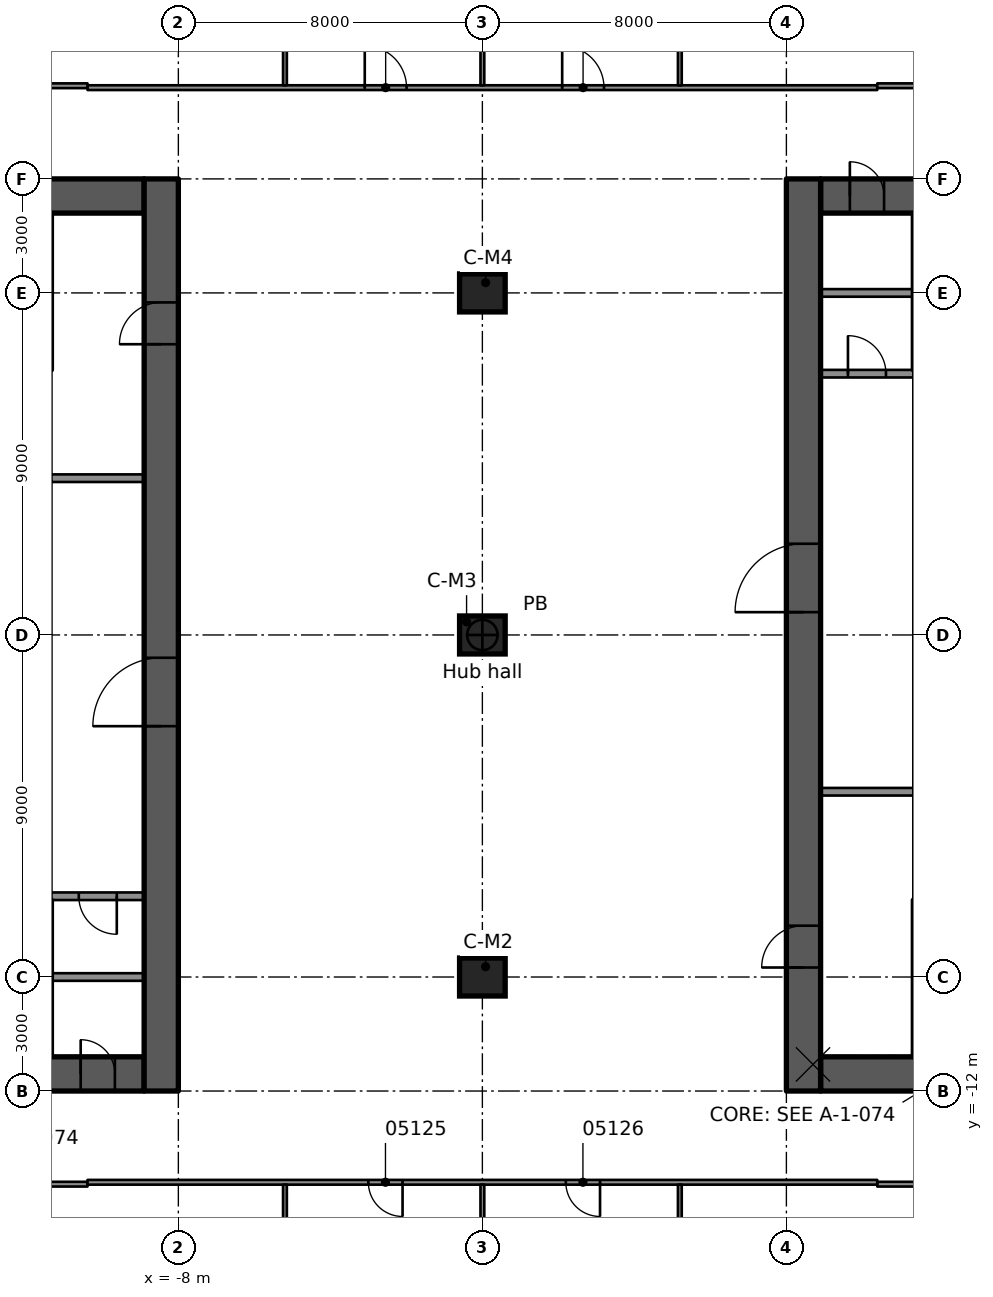
"""IFC4 building model, lengths in metres.
Left out: names, types, materials, properties, quantities, classifications, styles, units other than length and angle.
Written with IfcOpenShell. Run it as: python <this file> out.ifc"""

import sys

from ifc_helpers import new_model, si_unit, direction, frame, frame_2d, origin, origin_2d, place, context, subcontext, project, spatial, rectangle, extrude, element, fill, save


model = new_model("IFC4")
c1 = context("Model", 3, precision=1e-05, world=origin(), true_north=direction((0.0, 1.0)))
c2 = subcontext(c1, "Body", "Model", "MODEL_VIEW")
j1 = project(units=[si_unit("LENGTHUNIT", "METRE"), si_unit("PLANEANGLEUNIT", "RADIAN")], contexts=[c1])
p1 = place(None, origin())
s1 = spatial("IfcSite", under=j1, at=p1, CompositionType="ELEMENT")
p2 = place(p1, origin())
s2 = spatial("IfcBuilding", under=s1, at=p2, CompositionType="ELEMENT")
p3 = place(p2, frame((0.0, 0.0, 25.1)))
s3 = spatial("IfcBuildingStorey", under=s2, at=p3, CompositionType="ELEMENT", Elevation=25.1)
p4 = place(p3, frame((-18.1, 11.55, 0.0), z_axis=(0.0, 0.0, 1.0), x_axis=(1.0, 0.0, 0.0)))
e1 = element("IfcWall", 1, at=p4, inside=s3, PredefinedType="SHEAR", context=c2, shape_type="SweptSolid", body=[
    extrude(rectangle(XDim=9.2, YDim=0.9, at=frame_2d((4.6, 0.0))), origin(), (0.0, 0.0, 1.0), 4.1),
])
p5 = place(p4, frame((5.1, 0.0, 0.0)))
e2 = element("IfcOpeningElement", 2, at=p5, cuts=e1, PredefinedType="OPENING", context=c2, shape_type="SweptSolid", body=[
    extrude(rectangle(XDim=1.1, YDim=2.1, at=frame_2d((0.55, 1.05))), frame((0.0, 0.46, 0.0), z_axis=(0.0, -1.0, 0.0), x_axis=(1.0, 0.0, 0.0)), (0.0, 0.0, 1.0), 0.92),
])
p6 = place(p3, frame((-18.1, -11.55, 0.0), z_axis=(0.0, 0.0, 1.0), x_axis=(1.0, 0.0, 0.0)))
e3 = element("IfcWall", 3, at=p6, inside=s3, PredefinedType="SHEAR", context=c2, shape_type="SweptSolid", body=[
    extrude(rectangle(XDim=9.2, YDim=0.9, at=frame_2d((4.6, 0.0))), origin(), (0.0, 0.0, 1.0), 4.1),
])
p7 = place(p6, frame((5.1, 0.0, 0.0)))
e4 = element("IfcOpeningElement", 4, at=p7, cuts=e3, PredefinedType="OPENING", context=c2, shape_type="SweptSolid", body=[
    extrude(rectangle(XDim=1.1, YDim=2.1, at=frame_2d((0.55, 1.05))), frame((0.0, 0.46, 0.0), z_axis=(0.0, -1.0, 0.0), x_axis=(1.0, 0.0, 0.0)), (0.0, 0.0, 1.0), 0.92),
])
p8 = place(p6, frame((7.53, 0.0, 0.0)))
e5 = element("IfcOpeningElement", 5, at=p8, cuts=e3, PredefinedType="OPENING", context=c2, shape_type="SweptSolid", body=[
    extrude(rectangle(XDim=0.9, YDim=2.1, at=frame_2d((0.45, 1.05))), frame((0.0, 0.46, 0.0), z_axis=(0.0, -1.0, 0.0), x_axis=(1.0, 0.0, 0.0)), (0.0, 0.0, 1.0), 0.92),
])
p9 = place(p3, frame((-8.45, -12.0, 0.0), z_axis=(0.0, 0.0, 1.0), x_axis=(0.0, 1.0, 0.0)))
e6 = element("IfcWall", 6, at=p9, inside=s3, PredefinedType="SHEAR", context=c2, shape_type="SweptSolid", body=[
    extrude(rectangle(XDim=24.0, YDim=0.9, at=frame_2d((12.0, 0.0))), origin(), (0.0, 0.0, 1.0), 4.1),
])
p10 = place(p9, frame((9.6, 0.0, 0.0)))
e7 = element("IfcOpeningElement", 7, at=p10, cuts=e6, PredefinedType="OPENING", context=c2, shape_type="SweptSolid", body=[
    extrude(rectangle(XDim=1.8, YDim=2.1, at=frame_2d((0.9, 1.05))), frame((0.0, 0.46, 0.0), z_axis=(0.0, -1.0, 0.0), x_axis=(1.0, 0.0, 0.0)), (0.0, 0.0, 1.0), 0.92),
])
p11 = place(p9, frame((19.65, 0.0, 0.0)))
e8 = element("IfcOpeningElement", 8, at=p11, cuts=e6, PredefinedType="OPENING", context=c2, shape_type="SweptSolid", body=[
    extrude(rectangle(XDim=1.1, YDim=2.1, at=frame_2d((0.55, 1.05))), frame((0.0, 0.46, 0.0), z_axis=(0.0, -1.0, 0.0), x_axis=(1.0, 0.0, 0.0)), (0.0, 0.0, 1.0), 0.92),
])
p12 = place(p3, frame((8.9, 11.55, 0.0), z_axis=(0.0, 0.0, 1.0), x_axis=(1.0, 0.0, 0.0)))
e9 = element("IfcWall", 9, at=p12, inside=s3, PredefinedType="SHEAR", context=c2, shape_type="SweptSolid", body=[
    extrude(rectangle(XDim=9.2, YDim=0.9, at=frame_2d((4.6, 0.0))), origin(), (0.0, 0.0, 1.0), 4.1),
])
p13 = place(p12, frame((3.0, 0.0, 0.0)))
e10 = element("IfcOpeningElement", 10, at=p13, cuts=e9, PredefinedType="OPENING", context=c2, shape_type="SweptSolid", body=[
    extrude(rectangle(XDim=1.1, YDim=2.1, at=frame_2d((0.55, 1.05))), frame((0.0, 0.46, 0.0), z_axis=(0.0, -1.0, 0.0), x_axis=(1.0, 0.0, 0.0)), (0.0, 0.0, 1.0), 0.92),
])
p14 = place(p12, frame((0.77, 0.0, 0.0)))
e11 = element("IfcOpeningElement", 11, at=p14, cuts=e9, PredefinedType="OPENING", context=c2, shape_type="SweptSolid", body=[
    extrude(rectangle(XDim=0.9, YDim=2.1, at=frame_2d((0.45, 1.05))), frame((0.0, 0.46, 0.0), z_axis=(0.0, -1.0, 0.0), x_axis=(1.0, 0.0, 0.0)), (0.0, 0.0, 1.0), 0.92),
])
p15 = place(p3, frame((8.9, -11.55, 0.0), z_axis=(0.0, 0.0, 1.0), x_axis=(1.0, 0.0, 0.0)))
e12 = element("IfcWall", 12, at=p15, inside=s3, PredefinedType="SHEAR", context=c2, shape_type="SweptSolid", body=[
    extrude(rectangle(XDim=9.2, YDim=0.9, at=frame_2d((4.6, 0.0))), origin(), (0.0, 0.0, 1.0), 4.1),
])
p16 = place(p15, frame((3.0, 0.0, 0.0)))
e13 = element("IfcOpeningElement", 13, at=p16, cuts=e12, PredefinedType="OPENING", context=c2, shape_type="SweptSolid", body=[
    extrude(rectangle(XDim=1.1, YDim=2.1, at=frame_2d((0.55, 1.05))), frame((0.0, 0.46, 0.0), z_axis=(0.0, -1.0, 0.0), x_axis=(1.0, 0.0, 0.0)), (0.0, 0.0, 1.0), 0.92),
])
p17 = place(p3, frame((8.45, -12.0, 0.0), z_axis=(0.0, 0.0, 1.0), x_axis=(0.0, 1.0, 0.0)))
e14 = element("IfcWall", 14, at=p17, inside=s3, PredefinedType="SHEAR", context=c2, shape_type="SweptSolid", body=[
    extrude(rectangle(XDim=24.0, YDim=0.9, at=frame_2d((12.0, 0.0))), origin(), (0.0, 0.0, 1.0), 4.1),
])
p18 = place(p17, frame((12.6, 0.0, 0.0)))
e15 = element("IfcOpeningElement", 15, at=p18, cuts=e14, PredefinedType="OPENING", context=c2, shape_type="SweptSolid", body=[
    extrude(rectangle(XDim=1.8, YDim=2.1, at=frame_2d((0.9, 1.05))), frame((0.0, 0.46, 0.0), z_axis=(0.0, -1.0, 0.0), x_axis=(1.0, 0.0, 0.0)), (0.0, 0.0, 1.0), 0.92),
])
p19 = place(p17, frame((3.25, 0.0, 0.0)))
e16 = element("IfcOpeningElement", 16, at=p19, cuts=e14, PredefinedType="OPENING", context=c2, shape_type="SweptSolid", body=[
    extrude(rectangle(XDim=1.1, YDim=2.1, at=frame_2d((0.55, 1.05))), frame((0.0, 0.46, 0.0), z_axis=(0.0, -1.0, 0.0), x_axis=(1.0, 0.0, 0.0)), (0.0, 0.0, 1.0), 0.92),
])
for number, where, z_axis, x_axis in (
    (17, (0.0, -9.0, 0.0), (0.0, 0.0, 1.0), (1.0, 0.0, 0.0)),
    (18, (0.0, 0.0, 0.0), (0.0, 0.0, 1.0), (1.0, 0.0, 0.0)),
    (19, (0.0, 9.0, 0.0), (0.0, 0.0, 1.0), (1.0, 0.0, 0.0)),
):
    element("IfcColumn", number, at=place(p3, frame(where, z_axis=z_axis, x_axis=x_axis)), inside=s3, PredefinedType="COLUMN", context=c2, shape_type="SweptSolid", body=[
        extrude(rectangle(XDim=1.2, YDim=1.0, at=origin_2d()), origin(), (0.0, 0.0, 1.0), 4.1),
    ])
p20 = place(p3, frame((-8.9, 4.125, 0.0), z_axis=(0.0, 0.0, 1.0), x_axis=(-1.0, 0.0, 0.0)))
e20 = element("IfcWall", 20, at=p20, inside=s3, PredefinedType="PARTITIONING", context=c2, shape_type="SweptSolid", body=[
    extrude(rectangle(XDim=2.44, YDim=0.2, at=frame_2d((1.22, 0.0))), origin(), (0.0, 0.0, 1.0), 3.69),
])
p21 = place(p3, frame((-8.9, -6.875, 0.0), z_axis=(0.0, 0.0, 1.0), x_axis=(-1.0, 0.0, 0.0)))
e21 = element("IfcWall", 21, at=p21, inside=s3, PredefinedType="PARTITIONING", context=c2, shape_type="SweptSolid", body=[
    extrude(rectangle(XDim=2.44, YDim=0.2, at=frame_2d((1.22, 0.0))), origin(), (0.0, 0.0, 1.0), 3.69),
])
p22 = place(p21, frame((0.72, 0.0, 0.0)))
e22 = element("IfcOpeningElement", 22, at=p22, cuts=e21, PredefinedType="OPENING", context=c2, shape_type="SweptSolid", body=[
    extrude(rectangle(XDim=1.0, YDim=2.1, at=frame_2d((0.5, 1.05))), frame((0.0, 0.11, 0.0), z_axis=(0.0, -1.0, 0.0), x_axis=(1.0, 0.0, 0.0)), (0.0, 0.0, 1.0), 0.22),
])
for number, where, z_axis, x_axis in (
    (23, (-8.9, -9.0, 0.0), (0.0, 0.0, 1.0), (-1.0, 0.0, 0.0)),
    (24, (8.9, -4.125, 0.0), (0.0, 0.0, 1.0), (1.0, 0.0, 0.0)),
):
    element("IfcWall", number, at=place(p3, frame(where, z_axis=z_axis, x_axis=x_axis)), inside=s3, PredefinedType="PARTITIONING", context=c2, shape_type="SweptSolid", body=[
        extrude(rectangle(XDim=2.44, YDim=0.2, at=frame_2d((1.22, 0.0))), origin(), (0.0, 0.0, 1.0), 3.69),
    ])
p23 = place(p3, frame((8.9, 6.875, 0.0), z_axis=(0.0, 0.0, 1.0), x_axis=(1.0, 0.0, 0.0)))
e25 = element("IfcWall", 25, at=p23, inside=s3, PredefinedType="PARTITIONING", context=c2, shape_type="SweptSolid", body=[
    extrude(rectangle(XDim=2.44, YDim=0.2, at=frame_2d((1.22, 0.0))), origin(), (0.0, 0.0, 1.0), 3.69),
])
p24 = place(p23, frame((0.72, 0.0, 0.0)))
e26 = element("IfcOpeningElement", 26, at=p24, cuts=e25, PredefinedType="OPENING", context=c2, shape_type="SweptSolid", body=[
    extrude(rectangle(XDim=1.0, YDim=2.1, at=frame_2d((0.5, 1.05))), frame((0.0, 0.11, 0.0), z_axis=(0.0, -1.0, 0.0), x_axis=(1.0, 0.0, 0.0)), (0.0, 0.0, 1.0), 0.22),
])
p25 = place(p3, frame((8.9, 9.0, 0.0), z_axis=(0.0, 0.0, 1.0), x_axis=(1.0, 0.0, 0.0)))
e27 = element("IfcWall", 27, at=p25, inside=s3, PredefinedType="PARTITIONING", context=c2, shape_type="SweptSolid", body=[
    extrude(rectangle(XDim=2.44, YDim=0.2, at=frame_2d((1.22, 0.0))), origin(), (0.0, 0.0, 1.0), 3.69),
])
p26 = place(p3, frame((-18.262, -14.451, 0.0), z_axis=(0.0, 0.0, 1.0), x_axis=(1.0, 0.0, 0.0)))
e28 = element("IfcWall", 28, at=p26, inside=s3, PredefinedType="PARTITIONING", context=c2, shape_type="SweptSolid", body=[
    extrude(rectangle(XDim=7.871, YDim=0.125, at=frame_2d((3.936, 0.0))), origin(), (0.0, 0.0, 1.0), 3.68),
])
p27 = place(p3, frame((17.302, -14.451, 0.0), z_axis=(0.0, 0.0, 1.0), x_axis=(-1.0, 0.0, 0.0)))
e29 = element("IfcWall", 29, at=p27, inside=s3, PredefinedType="PARTITIONING", context=c2, shape_type="SweptSolid", body=[
    extrude(rectangle(XDim=6.911, YDim=0.125, at=frame_2d((3.456, 0.0))), origin(), (0.0, 0.0, 1.0), 3.68),
])
p28 = place(p27, frame((2.6, 0.0, 0.0)))
e30 = element("IfcOpeningElement", 30, at=p28, cuts=e29, PredefinedType="OPENING", context=c2, shape_type="SweptSolid", body=[
    extrude(rectangle(XDim=1.8, YDim=2.1, at=frame_2d((0.9, 1.05))), frame((0.0, 0.073, 0.0), z_axis=(0.0, -1.0, 0.0), x_axis=(1.0, 0.0, 0.0)), (0.0, 0.0, 1.0), 0.145),
])
p29 = place(p3, frame((10.391, -14.401, 0.0), z_axis=(0.0, 0.0, 1.0), x_axis=(-1.0, 0.0, 0.0)))
e31 = element("IfcWall", 31, at=p29, inside=s3, PredefinedType="PARTITIONING", context=c2, shape_type="SweptSolid", body=[
    extrude(rectangle(XDim=20.781, YDim=0.125, at=frame_2d((10.391, 0.0))), origin(), (0.0, 0.0, 1.0), 3.68),
])
p30 = place(p29, frame((12.491, 0.0, 0.0)))
e32 = element("IfcOpeningElement", 32, at=p30, cuts=e31, PredefinedType="OPENING", context=c2, shape_type="SweptSolid", body=[
    extrude(rectangle(XDim=0.9, YDim=2.1, at=frame_2d((0.45, 1.05))), frame((0.0, 0.073, 0.0), z_axis=(0.0, -1.0, 0.0), x_axis=(1.0, 0.0, 0.0)), (0.0, 0.0, 1.0), 0.145),
])
p31 = place(p29, frame((7.295, 0.0, 0.0)))
e33 = element("IfcOpeningElement", 33, at=p31, cuts=e31, PredefinedType="OPENING", context=c2, shape_type="SweptSolid", body=[
    extrude(rectangle(XDim=0.9, YDim=2.1, at=frame_2d((0.45, 1.05))), frame((0.0, 0.073, 0.0), z_axis=(0.0, -1.0, 0.0), x_axis=(1.0, 0.0, 0.0)), (0.0, 0.0, 1.0), 0.145),
])
p32 = place(p3, frame((-10.39, 14.401, 0.0), z_axis=(0.0, 0.0, 1.0), x_axis=(1.0, 0.0, 0.0)))
e34 = element("IfcWall", 34, at=p32, inside=s3, PredefinedType="PARTITIONING", context=c2, shape_type="SweptSolid", body=[
    extrude(rectangle(XDim=20.781, YDim=0.125, at=frame_2d((10.391, 0.0))), origin(), (0.0, 0.0, 1.0), 3.68),
])
p33 = place(p32, frame((12.49, 0.0, 0.0)))
e35 = element("IfcOpeningElement", 35, at=p33, cuts=e34, PredefinedType="OPENING", context=c2, shape_type="SweptSolid", body=[
    extrude(rectangle(XDim=1.1, YDim=2.1, at=frame_2d((0.55, 1.05))), frame((0.0, 0.073, 0.0), z_axis=(0.0, -1.0, 0.0), x_axis=(1.0, 0.0, 0.0)), (0.0, 0.0, 1.0), 0.145),
])
p34 = place(p32, frame((7.295, 0.0, 0.0)))
e36 = element("IfcOpeningElement", 36, at=p34, cuts=e34, PredefinedType="OPENING", context=c2, shape_type="SweptSolid", body=[
    extrude(rectangle(XDim=1.1, YDim=2.1, at=frame_2d((0.55, 1.05))), frame((0.0, 0.073, 0.0), z_axis=(0.0, -1.0, 0.0), x_axis=(1.0, 0.0, 0.0)), (0.0, 0.0, 1.0), 0.145),
])
p35 = place(p3, frame((-21.387, 14.451, 0.0), z_axis=(0.0, 0.0, 1.0), x_axis=(1.0, 0.0, 0.0)))
e37 = element("IfcWall", 37, at=p35, inside=s3, PredefinedType="PARTITIONING", context=c2, shape_type="SweptSolid", body=[
    extrude(rectangle(XDim=10.996, YDim=0.125, at=frame_2d((5.498, 0.0))), origin(), (0.0, 0.0, 1.0), 3.68),
])
p36 = place(p35, frame((7.317, 0.0, 0.0)))
e38 = element("IfcOpeningElement", 38, at=p36, cuts=e37, PredefinedType="OPENING", context=c2, shape_type="SweptSolid", body=[
    extrude(rectangle(XDim=1.8, YDim=2.1, at=frame_2d((0.9, 1.05))), frame((0.0, 0.073, 0.0), z_axis=(0.0, -1.0, 0.0), x_axis=(1.0, 0.0, 0.0)), (0.0, 0.0, 1.0), 0.145),
])
p37 = place(p3, frame((10.391, 14.451, 0.0), z_axis=(0.0, 0.0, 1.0), x_axis=(1.0, 0.0, 0.0)))
e39 = element("IfcWall", 39, at=p37, inside=s3, PredefinedType="PARTITIONING", context=c2, shape_type="SweptSolid", body=[
    extrude(rectangle(XDim=10.996, YDim=0.125, at=frame_2d((5.498, 0.0))), origin(), (0.0, 0.0, 1.0), 3.68),
])
p38 = place(p37, frame((1.85, 0.0, 0.0)))
e40 = element("IfcOpeningElement", 40, at=p38, cuts=e39, PredefinedType="OPENING", context=c2, shape_type="SweptSolid", body=[
    extrude(rectangle(XDim=1.8, YDim=2.1, at=frame_2d((0.9, 1.05))), frame((0.0, 0.073, 0.0), z_axis=(0.0, -1.0, 0.0), x_axis=(1.0, 0.0, 0.0)), (0.0, 0.0, 1.0), 0.145),
])
for number, where, z_axis, x_axis in (
    (41, (5.196, -30.25, 0.0), (0.0, 0.0, 1.0), (0.0, 1.0, 0.0)),
    (42, (5.196, 14.463, 0.0), (0.0, 0.0, 1.0), (0.0, 1.0, 0.0)),
    (43, (0.0, -30.25, 0.0), (0.0, 0.0, 1.0), (0.0, 1.0, 0.0)),
    (44, (0.0, 14.463, 0.0), (0.0, 0.0, 1.0), (0.0, 1.0, 0.0)),
    (45, (-5.195, -30.25, 0.0), (0.0, 0.0, 1.0), (0.0, 1.0, 0.0)),
    (46, (-5.195, 14.463, 0.0), (0.0, 0.0, 1.0), (0.0, 1.0, 0.0)),
):
    element("IfcWall", number, at=place(p3, frame(where, z_axis=z_axis, x_axis=x_axis)), inside=s3, PredefinedType="PARTITIONING", context=c2, shape_type="SweptSolid", body=[
        extrude(rectangle(XDim=15.787, YDim=0.1, at=frame_2d((7.894, 0.0))), origin(), (0.0, 0.0, 1.0), 3.68),
    ])
p39 = place(p10, origin())
e47 = element("IfcDoor", 47, at=p39, inside=s3, OperationType="SINGLE_SWING_LEFT", PredefinedType="DOOR", context=c2, shape_type="SweptSolid", body=[
    extrude(rectangle(XDim=1.8, YDim=2.1, at=frame_2d((0.9, 1.05))), frame((0.0, 0.025, 0.0), z_axis=(0.0, -1.0, 0.0), x_axis=(1.0, 0.0, 0.0)), (0.0, 0.0, 1.0), 0.05),
])
fill(e7, e47)
p40 = place(p11, origin())
e48 = element("IfcDoor", 48, at=p40, inside=s3, OperationType="SINGLE_SWING_RIGHT", PredefinedType="DOOR", context=c2, shape_type="SweptSolid", body=[
    extrude(rectangle(XDim=1.1, YDim=2.1, at=frame_2d((0.55, 1.05))), frame((0.0, 0.025, 0.0), z_axis=(0.0, -1.0, 0.0), x_axis=(1.0, 0.0, 0.0)), (0.0, 0.0, 1.0), 0.05),
])
fill(e8, e48)
p41 = place(p8, origin())
e49 = element("IfcDoor", 49, at=p41, inside=s3, OperationType="SINGLE_SWING_RIGHT", PredefinedType="DOOR", context=c2, shape_type="SweptSolid", body=[
    extrude(rectangle(XDim=0.9, YDim=2.1, at=frame_2d((0.45, 1.05))), frame((0.0, 0.025, 0.0), z_axis=(0.0, -1.0, 0.0), x_axis=(1.0, 0.0, 0.0)), (0.0, 0.0, 1.0), 0.05),
])
fill(e5, e49)
p42 = place(p22, origin())
e50 = element("IfcDoor", 50, at=p42, inside=s3, OperationType="SINGLE_SWING_RIGHT", PredefinedType="DOOR", context=c2, shape_type="SweptSolid", body=[
    extrude(rectangle(XDim=1.0, YDim=2.1, at=frame_2d((0.5, 1.05))), frame((0.0, 0.025, 0.0), z_axis=(0.0, -1.0, 0.0), x_axis=(1.0, 0.0, 0.0)), (0.0, 0.0, 1.0), 0.05),
])
fill(e22, e50)
p43 = place(p18, origin())
e51 = element("IfcDoor", 51, at=p43, inside=s3, OperationType="SINGLE_SWING_RIGHT", PredefinedType="DOOR", context=c2, shape_type="SweptSolid", body=[
    extrude(rectangle(XDim=1.8, YDim=2.1, at=frame_2d((0.9, 1.05))), frame((0.0, 0.025, 0.0), z_axis=(0.0, -1.0, 0.0), x_axis=(1.0, 0.0, 0.0)), (0.0, 0.0, 1.0), 0.05),
])
fill(e15, e51)
p44 = place(p19, origin())
e52 = element("IfcDoor", 52, at=p44, inside=s3, OperationType="SINGLE_SWING_LEFT", PredefinedType="DOOR", context=c2, shape_type="SweptSolid", body=[
    extrude(rectangle(XDim=1.1, YDim=2.1, at=frame_2d((0.55, 1.05))), frame((0.0, 0.025, 0.0), z_axis=(0.0, -1.0, 0.0), x_axis=(1.0, 0.0, 0.0)), (0.0, 0.0, 1.0), 0.05),
])
fill(e16, e52)
p45 = place(p14, origin())
e53 = element("IfcDoor", 53, at=p45, inside=s3, OperationType="SINGLE_SWING_LEFT", PredefinedType="DOOR", context=c2, shape_type="SweptSolid", body=[
    extrude(rectangle(XDim=0.9, YDim=2.1, at=frame_2d((0.45, 1.05))), frame((0.0, 0.025, 0.0), z_axis=(0.0, -1.0, 0.0), x_axis=(1.0, 0.0, 0.0)), (0.0, 0.0, 1.0), 0.05),
])
fill(e11, e53)
p46 = place(p24, origin())
e54 = element("IfcDoor", 54, at=p46, inside=s3, OperationType="SINGLE_SWING_RIGHT", PredefinedType="DOOR", context=c2, shape_type="SweptSolid", body=[
    extrude(rectangle(XDim=1.0, YDim=2.1, at=frame_2d((0.5, 1.05))), frame((0.0, 0.025, 0.0), z_axis=(0.0, -1.0, 0.0), x_axis=(1.0, 0.0, 0.0)), (0.0, 0.0, 1.0), 0.05),
])
fill(e26, e54)
p47 = place(p30, origin())
e55 = element("IfcDoor", 55, at=p47, inside=s3, OperationType="SINGLE_SWING_RIGHT", PredefinedType="DOOR", context=c2, shape_type="SweptSolid", body=[
    extrude(rectangle(XDim=0.9, YDim=2.1, at=frame_2d((0.45, 1.05))), frame((0.0, 0.025, 0.0), z_axis=(0.0, -1.0, 0.0), x_axis=(1.0, 0.0, 0.0)), (0.0, 0.0, 1.0), 0.05),
])
fill(e32, e55)
p48 = place(p31, origin())
e56 = element("IfcDoor", 56, at=p48, inside=s3, OperationType="SINGLE_SWING_LEFT", PredefinedType="DOOR", context=c2, shape_type="SweptSolid", body=[
    extrude(rectangle(XDim=0.9, YDim=2.1, at=frame_2d((0.45, 1.05))), frame((0.0, 0.025, 0.0), z_axis=(0.0, -1.0, 0.0), x_axis=(1.0, 0.0, 0.0)), (0.0, 0.0, 1.0), 0.05),
])
fill(e33, e56)
p49 = place(p33, origin())
e57 = element("IfcDoor", 57, at=p49, inside=s3, OperationType="SINGLE_SWING_RIGHT", PredefinedType="DOOR", context=c2, shape_type="SweptSolid", body=[
    extrude(rectangle(XDim=1.1, YDim=2.1, at=frame_2d((0.55, 1.05))), frame((0.0, 0.025, 0.0), z_axis=(0.0, -1.0, 0.0), x_axis=(1.0, 0.0, 0.0)), (0.0, 0.0, 1.0), 0.05),
])
fill(e35, e57)
p50 = place(p34, origin())
e58 = element("IfcDoor", 58, at=p50, inside=s3, OperationType="SINGLE_SWING_LEFT", PredefinedType="DOOR", context=c2, shape_type="SweptSolid", body=[
    extrude(rectangle(XDim=1.1, YDim=2.1, at=frame_2d((0.55, 1.05))), frame((0.0, 0.025, 0.0), z_axis=(0.0, -1.0, 0.0), x_axis=(1.0, 0.0, 0.0)), (0.0, 0.0, 1.0), 0.05),
])
fill(e36, e58)
save(model, sys.argv[1])
